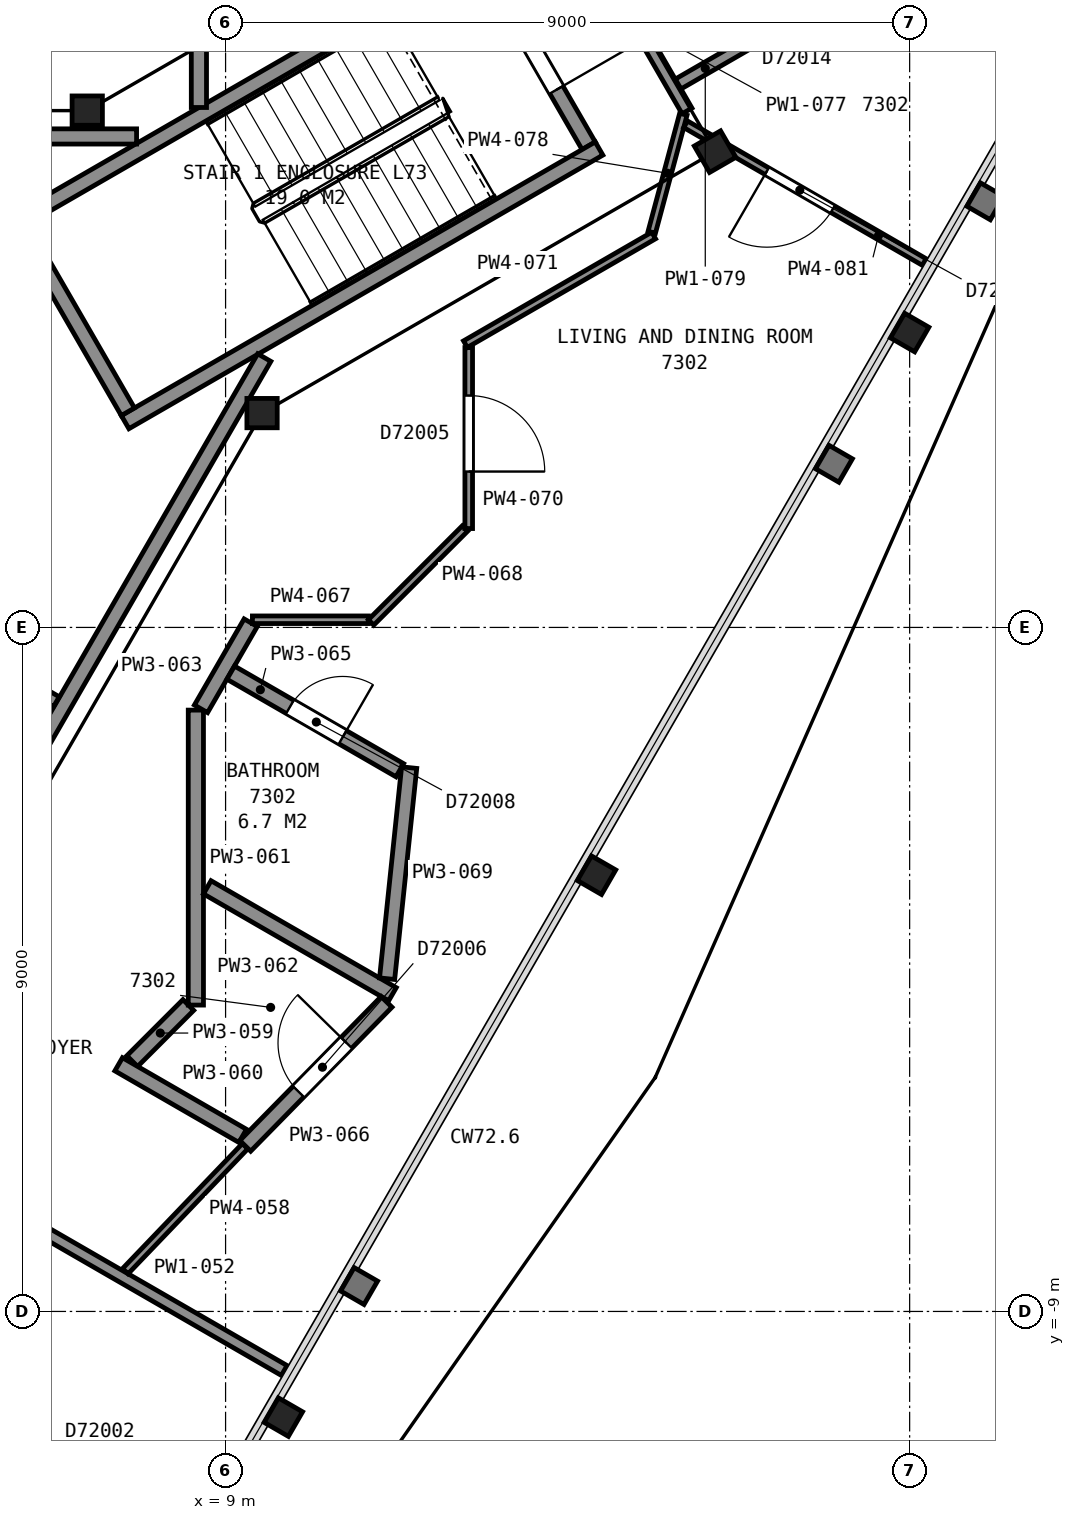
"""IFC4 building model, lengths in metres.
Left out: names, types, materials, properties, quantities, classifications, styles, units other than length and angle.
Written with IfcOpenShell. Run it as: python <this file> out.ifc"""

import sys

from ifc_helpers import new_model, si_unit, direction, frame, frame_2d, origin, origin_2d, place, context, subcontext, project, spatial, rectangle, i_section, extrude, element, fill, save


model = new_model("IFC4")
c1 = context("Model", 3, precision=1e-05, world=origin(), true_north=direction((0.0, 1.0)))
c2 = subcontext(c1, "Body", "Model", "MODEL_VIEW")
j1 = project(units=[si_unit("LENGTHUNIT", "METRE"), si_unit("PLANEANGLEUNIT", "RADIAN")], contexts=[c1])
p1 = place(None, origin())
s1 = spatial("IfcSite", under=j1, at=p1, CompositionType="ELEMENT")
p2 = place(p1, origin())
s2 = spatial("IfcBuilding", under=s1, at=p2, CompositionType="ELEMENT")
p3 = place(p2, frame((0.0, 0.0, 289.9)))
s3 = spatial("IfcBuildingStorey", under=s2, at=p3, CompositionType="ELEMENT", Elevation=289.9)
for number, where, z_axis, x_axis in (
    (1, (9.76, -10.39, 0.0), (0.0, 0.0, 1.0), (-0.5, -0.866, 0.0)),
    (2, (13.88, -3.26, 0.0), (0.0, 0.0, 1.0), (-0.5, -0.866, 0.0)),
    (3, (18.0, 3.88, 0.0), (0.0, 0.0, 1.0), (-0.5, -0.866, 0.0)),
):
    element("IfcColumn", number, at=place(p3, frame(where, z_axis=z_axis, x_axis=x_axis)), inside=s3, PredefinedType="COLUMN", context=c2, shape_type="SweptSolid", body=[
        extrude(i_section(OverallWidth=0.373, OverallDepth=0.368, WebThickness=0.015, FlangeThickness=0.024, FilletRadius=0.015, at=origin_2d()), origin(), (0.0, 0.0, 1.0), 3.7),
    ])
p4 = place(p3, frame((9.48, 2.82, 0.0), z_axis=(0.0, 0.0, 1.0), x_axis=(1.0, 0.0, 0.0)))
e4 = element("IfcColumn", 4, at=p4, inside=s3, PredefinedType="COLUMN", context=c2, shape_type="SweptSolid", body=[
    extrude(i_section(OverallWidth=0.399, OverallDepth=0.386, WebThickness=0.021, FlangeThickness=0.033, FilletRadius=0.015, at=origin_2d()), origin(), (0.0, 0.0, 1.0), 3.7),
])
p5 = place(p3, frame((15.44, 6.26, 0.0), z_axis=(0.0, 0.0, 1.0), x_axis=(0.5, -0.866025403784, 0.0)))
e5 = element("IfcColumn", 5, at=p5, inside=s3, PredefinedType="COLUMN", context=c2, shape_type="SweptSolid", body=[
    extrude(i_section(OverallWidth=0.401, OverallDepth=0.399, WebThickness=0.025, FlangeThickness=0.04, FilletRadius=0.015, at=origin_2d()), origin(), (0.0, 0.0, 1.0), 3.7),
])
p6 = place(p3, frame((7.18, 6.8, 0.0), z_axis=(0.0, 0.0, 1.0), x_axis=(1.0, 0.0, 0.0)))
e6 = element("IfcColumn", 6, at=p6, inside=s3, PredefinedType="COLUMN", context=c2, shape_type="SweptSolid", body=[
    extrude(i_section(OverallWidth=0.399, OverallDepth=0.386, WebThickness=0.021, FlangeThickness=0.033, FilletRadius=0.015, at=origin_2d()), origin(), (0.0, 0.0, 1.0), 3.7),
])
p7 = place(p3, frame((13.777, 6.338, 0.0), z_axis=(0.0, 0.0, 1.0), x_axis=(-0.500049511043, 0.865996816683, 0.0)))
e7 = element("IfcWall", 7, at=p7, inside=s3, PredefinedType="PARTITIONING", context=c2, shape_type="SweptSolid", body=[
    extrude(rectangle(XDim=2.8, YDim=0.2, at=frame_2d((1.4, 0.0))), origin(), (0.0, 0.0, 1.0), 3.45),
])
p8 = place(p7, frame((0.85, 0.0, 0.0)))
e8 = element("IfcOpeningElement", 8, at=p8, cuts=e7, PredefinedType="OPENING", context=c2, shape_type="SweptSolid", body=[
    extrude(rectangle(XDim=1.1, YDim=2.1, at=frame_2d((0.55, 1.05))), frame((0.0, 0.11, 0.0), z_axis=(0.0, -1.0, 0.0), x_axis=(1.0, 0.0, 0.0)), (0.0, 0.0, 1.0), 0.22),
])
for number, where, z_axis, x_axis in (
    (9, (6.178, 5.299, 0.0), (0.0, 0.0, 1.0), (0.866, 0.5, 0.0)),
    (10, (7.678, 2.701, 0.0), (0.0, 0.0, 1.0), (0.866, 0.5, 0.0)),
):
    element("IfcWall", number, at=place(p3, frame(where, z_axis=z_axis, x_axis=x_axis)), inside=s3, PredefinedType="PARTITIONING", context=c2, shape_type="SweptSolid", body=[
        extrude(rectangle(XDim=7.2, YDim=0.2, at=frame_2d((3.6, 0.0))), origin(), (0.0, 0.0, 1.0), 3.45),
    ])
p9 = place(p3, frame((7.715, 2.838, 0.0), z_axis=(0.0, 0.0, 1.0), x_axis=(-0.500049511043, 0.865996816683, 0.0)))
e11 = element("IfcWall", 11, at=p9, inside=s3, PredefinedType="PARTITIONING", context=c2, shape_type="SweptSolid", body=[
    extrude(rectangle(XDim=2.8, YDim=0.2, at=frame_2d((1.4, 0.0))), origin(), (0.0, 0.0, 1.0), 3.45),
])
p10 = place(p3, frame((7.829, 6.46, 0.0), z_axis=(0.0, 0.0, 1.0), x_axis=(-1.0, 0.0, 0.0)))
e12 = element("IfcWall", 12, at=p10, inside=s3, PredefinedType="PARTITIONING", context=c2, shape_type="SweptSolid", body=[
    extrude(rectangle(XDim=15.658, YDim=0.2, at=frame_2d((7.829, 0.0))), origin(), (0.0, 0.0, 1.0), 3.45),
])
p11 = place(p10, frame((12.168, 0.0, 0.0)))
e13 = element("IfcOpeningElement", 13, at=p11, cuts=e12, PredefinedType="OPENING", context=c2, shape_type="SweptSolid", body=[
    extrude(rectangle(XDim=1.2, YDim=2.1, at=frame_2d((0.6, 1.05))), frame((0.0, 0.11, 0.0), z_axis=(0.0, -1.0, 0.0), x_axis=(1.0, 0.0, 0.0)), (0.0, 0.0, 1.0), 0.22),
])
p12 = place(p3, frame((3.828, -6.29, 0.0), z_axis=(0.0, 0.0, 1.0), x_axis=(0.499979739078, 0.866037101117, 0.0)))
e14 = element("IfcWall", 14, at=p12, inside=s3, PredefinedType="PARTITIONING", context=c2, shape_type="SweptSolid", body=[
    extrude(rectangle(XDim=11.363, YDim=0.2, at=frame_2d((5.681, 0.0))), origin(), (0.0, 0.0, 1.0), 3.45),
])
p13 = place(p12, frame((0.55, 0.0, 0.0)))
e15 = element("IfcOpeningElement", 15, at=p13, cuts=e14, PredefinedType="OPENING", context=c2, shape_type="SweptSolid", body=[
    extrude(rectangle(XDim=1.2, YDim=2.1, at=frame_2d((0.6, 1.05))), frame((0.0, 0.11, 0.0), z_axis=(0.0, -1.0, 0.0), x_axis=(1.0, 0.0, 0.0)), (0.0, 0.0, 1.0), 0.22),
])
p14 = place(p3, frame((6.774, -0.978, 0.0), z_axis=(0.0, 0.0, 1.0), x_axis=(-0.866062920605, 0.499935013329, 0.0)))
e16 = element("IfcWall", 16, at=p14, inside=s3, PredefinedType="PARTITIONING", context=c2, shape_type="SweptSolid", body=[
    extrude(rectangle(XDim=2.22, YDim=0.15, at=frame_2d((1.11, 0.0))), origin(), (0.0, 0.0, 1.0), 3.45),
])
p15 = place(p14, frame((0.646, 0.0, 0.0)))
e17 = element("IfcOpeningElement", 17, at=p15, cuts=e16, PredefinedType="OPENING", context=c2, shape_type="SweptSolid", body=[
    extrude(rectangle(XDim=0.9, YDim=2.1, at=frame_2d((0.45, 1.05))), frame((0.0, 0.085, 0.0), z_axis=(0.0, -1.0, 0.0), x_axis=(1.0, 0.0, 0.0)), (0.0, 0.0, 1.0), 0.17),
])
p16 = place(p3, frame((3.682, -9.495, 0.0), z_axis=(0.0, 0.0, 1.0), x_axis=(0.866046690806, -0.499963127985, 0.0)))
e18 = element("IfcWall", 18, at=p16, inside=s3, PredefinedType="PARTITIONING", context=c2, shape_type="SweptSolid", body=[
    extrude(rectangle(XDim=3.454, YDim=0.2, at=frame_2d((1.727, 0.0))), origin(), (0.0, 0.0, 1.0), 2.723),
])
p17 = place(p3, frame((9.772, -9.777, 0.0), z_axis=(0.0, 0.0, 1.0), x_axis=(-0.866083818164, 0.499898809675, 0.0)))
e19 = element("IfcWall", 19, at=p17, inside=s3, PredefinedType="PARTITIONING", context=c2, shape_type="SweptSolid", body=[
    extrude(rectangle(XDim=6.551, YDim=0.15, at=frame_2d((3.275, 0.0))), origin(), (0.0, 0.0, 1.0), 2.723),
])
p18 = place(p17, frame((4.001, 0.0, 0.0)))
e20 = element("IfcOpeningElement", 20, at=p18, cuts=e19, PredefinedType="OPENING", context=c2, shape_type="SweptSolid", body=[
    extrude(rectangle(XDim=1.0, YDim=2.1, at=frame_2d((0.5, 1.05))), frame((0.0, 0.085, 0.0), z_axis=(0.0, -1.0, 0.0), x_axis=(1.0, 0.0, 0.0)), (0.0, 0.0, 1.0), 0.17),
])
p19 = place(p3, frame((7.681, -8.47, 0.0), z_axis=(0.0, 0.0, 1.0), x_axis=(0.691774963189, 0.722113149239, 0.0)))
e21 = element("IfcWall", 21, at=p19, inside=s3, PredefinedType="PARTITIONING", context=c2, shape_type="SweptSolid", body=[
    extrude(rectangle(XDim=2.277, YDim=0.1, at=frame_2d((1.139, 0.0))), origin(), (0.0, 0.0, 1.0), 2.723),
])
p20 = place(p3, frame((7.772, -5.706, 0.0), z_axis=(0.0, 0.0, 1.0), x_axis=(0.707106781187, 0.707106781187, 0.0)))
e22 = element("IfcWall", 22, at=p20, inside=s3, PredefinedType="PARTITIONING", context=c2, shape_type="SweptSolid", body=[
    extrude(rectangle(XDim=1.044, YDim=0.2, at=frame_2d((0.522, 0.0))), origin(), (0.0, 0.0, 1.0), 2.723),
])
p21 = place(p3, frame((7.594, -5.748, 0.0), z_axis=(0.0, 0.0, 1.0), x_axis=(0.866049635583, -0.499958026946, 0.0)))
e23 = element("IfcWall", 23, at=p21, inside=s3, PredefinedType="PARTITIONING", context=c2, shape_type="SweptSolid", body=[
    extrude(rectangle(XDim=1.884, YDim=0.2, at=frame_2d((0.942, 0.0))), origin(), (0.0, 0.0, 1.0), 2.723),
])
p22 = place(p3, frame((8.609, -4.969, 0.0), z_axis=(0.0, 0.0, 1.0), x_axis=(0.0, 1.0, 0.0)))
e24 = element("IfcWall", 24, at=p22, inside=s3, PredefinedType="PARTITIONING", context=c2, shape_type="SweptSolid", body=[
    extrude(rectangle(XDim=3.881, YDim=0.2, at=frame_2d((1.94, 0.0))), origin(), (0.0, 0.0, 1.0), 2.723),
])
p23 = place(p3, frame((8.759, -3.42, 0.0), z_axis=(0.0, 0.0, 1.0), x_axis=(0.866098885879, -0.499872703674, 0.0)))
e25 = element("IfcWall", 25, at=p23, inside=s3, PredefinedType="PARTITIONING", context=c2, shape_type="SweptSolid", body=[
    extrude(rectangle(XDim=2.813, YDim=0.2, at=frame_2d((1.407, 0.0))), origin(), (0.0, 0.0, 1.0), 2.723),
])
p24 = place(p3, frame((8.677, -1.071, 0.0), z_axis=(0.0, 0.0, 1.0), x_axis=(0.49993245451, 0.866064397679, 0.0)))
e26 = element("IfcWall", 26, at=p24, inside=s3, PredefinedType="PARTITIONING", context=c2, shape_type="SweptSolid", body=[
    extrude(rectangle(XDim=1.308, YDim=0.2, at=frame_2d((0.654, 0.0))), origin(), (0.0, 0.0, 1.0), 2.723),
])
p25 = place(p3, frame((8.649, 6.841, 0.0), z_axis=(0.0, 0.0, 1.0), x_axis=(0.0, 1.0, 0.0)))
e27 = element("IfcWall", 27, at=p25, inside=s3, PredefinedType="PARTITIONING", context=c2, shape_type="SweptSolid", body=[
    extrude(rectangle(XDim=1.528, YDim=0.2, at=frame_2d((0.764, 0.0))), origin(), (0.0, 0.0, 1.0), 2.723),
])
p26 = place(p3, frame((11.292, -1.879, 0.0), z_axis=(0.0, 0.0, 1.0), x_axis=(-0.866123870273, 0.499829412243, 0.0)))
e28 = element("IfcWall", 28, at=p26, inside=s3, PredefinedType="PARTITIONING", context=c2, shape_type="SweptSolid", body=[
    extrude(rectangle(XDim=2.569, YDim=0.2, at=frame_2d((1.284, 0.0))), origin(), (0.0, 0.0, 1.0), 2.723),
])
p27 = place(p26, frame((0.869, 0.0, 0.0)))
e29 = element("IfcOpeningElement", 29, at=p27, cuts=e28, PredefinedType="OPENING", context=c2, shape_type="SweptSolid", body=[
    extrude(rectangle(XDim=0.8, YDim=2.1, at=frame_2d((0.4, 1.05))), frame((0.0, 0.11, 0.0), z_axis=(0.0, -1.0, 0.0), x_axis=(1.0, 0.0, 0.0)), (0.0, 0.0, 1.0), 0.22),
])
p28 = place(p3, frame((9.259, -6.821, 0.0), z_axis=(0.0, 0.0, 1.0), x_axis=(0.700360124324, 0.713789672282, 0.0)))
e30 = element("IfcWall", 30, at=p28, inside=s3, PredefinedType="PARTITIONING", context=c2, shape_type="SweptSolid", body=[
    extrude(rectangle(XDim=2.654, YDim=0.2, at=frame_2d((1.327, 0.0))), origin(), (0.0, 0.0, 1.0), 2.723),
])
p29 = place(p28, frame((1.0, 0.0, 0.0)))
e31 = element("IfcOpeningElement", 31, at=p29, cuts=e30, PredefinedType="OPENING", context=c2, shape_type="SweptSolid", body=[
    extrude(rectangle(XDim=0.9, YDim=2.1, at=frame_2d((0.45, 1.05))), frame((0.0, 0.11, 0.0), z_axis=(0.0, -1.0, 0.0), x_axis=(1.0, 0.0, 0.0)), (0.0, 0.0, 1.0), 0.22),
])
p30 = place(p3, frame((9.353, 0.101, 0.0), z_axis=(0.0, 0.0, 1.0), x_axis=(1.0, 0.0, 0.0)))
e32 = element("IfcWall", 32, at=p30, inside=s3, PredefinedType="PARTITIONING", context=c2, shape_type="SweptSolid", body=[
    extrude(rectangle(XDim=1.526, YDim=0.1, at=frame_2d((0.763, 0.0))), origin(), (0.0, 0.0, 1.0), 2.723),
])
p31 = place(p3, frame((10.914, 0.066, 0.0), z_axis=(0.0, 0.0, 1.0), x_axis=(0.707106781187, 0.707106781187, 0.0)))
e33 = element("IfcWall", 33, at=p31, inside=s3, PredefinedType="PARTITIONING", context=c2, shape_type="SweptSolid", body=[
    extrude(rectangle(XDim=1.748, YDim=0.1, at=frame_2d((0.874, 0.0))), origin(), (0.0, 0.0, 1.0), 2.723),
])
p32 = place(p3, frame((11.125, -4.622, 0.0), z_axis=(0.0, 0.0, 1.0), x_axis=(0.103952036587, 0.99458231137, 0.0)))
e34 = element("IfcWall", 34, at=p32, inside=s3, PredefinedType="PARTITIONING", context=c2, shape_type="SweptSolid", body=[
    extrude(rectangle(XDim=2.792, YDim=0.2, at=frame_2d((1.396, 0.0))), origin(), (0.0, 0.0, 1.0), 2.723),
])
p33 = place(p3, frame((12.199, 3.682, 0.0), z_axis=(0.0, 0.0, 1.0), x_axis=(0.0, -1.0, 0.0)))
e35 = element("IfcWall", 35, at=p33, inside=s3, PredefinedType="PARTITIONING", context=c2, shape_type="SweptSolid", body=[
    extrude(rectangle(XDim=2.381, YDim=0.1, at=frame_2d((1.19, 0.0))), origin(), (0.0, 0.0, 1.0), 2.723),
])
p34 = place(p33, frame((0.631, 0.0, 0.0)))
e36 = element("IfcOpeningElement", 36, at=p34, cuts=e35, PredefinedType="OPENING", context=c2, shape_type="SweptSolid", body=[
    extrude(rectangle(XDim=1.0, YDim=2.1, at=frame_2d((0.5, 1.05))), frame((0.0, 0.06, 0.0), z_axis=(0.0, -1.0, 0.0), x_axis=(1.0, 0.0, 0.0)), (0.0, 0.0, 1.0), 0.12),
])
p35 = place(p3, frame((12.156, 3.727, 0.0), z_axis=(0.0, 0.0, 1.0), x_axis=(0.866012137121, 0.500022977831, 0.0)))
e37 = element("IfcWall", 37, at=p35, inside=s3, PredefinedType="PARTITIONING", context=c2, shape_type="SweptSolid", body=[
    extrude(rectangle(XDim=2.86, YDim=0.1, at=frame_2d((1.43, 0.0))), origin(), (0.0, 0.0, 1.0), 2.723),
])
p36 = place(p3, frame((13.759, 9.069, 0.0), z_axis=(0.0, 0.0, 1.0), x_axis=(0.500020344131, -0.866013657776, 0.0)))
e38 = element("IfcWall", 38, at=p36, inside=s3, PredefinedType="PARTITIONING", context=c2, shape_type="SweptSolid", body=[
    extrude(rectangle(XDim=2.625, YDim=0.15, at=frame_2d((1.312, 0.0))), origin(), (0.0, 0.0, 1.0), 2.723),
])
p37 = place(p3, frame((14.607, 5.2, 0.0), z_axis=(0.0, 0.0, 1.0), x_axis=(0.258589257768, 0.965987368327, 0.0)))
e39 = element("IfcWall", 39, at=p37, inside=s3, PredefinedType="PARTITIONING", context=c2, shape_type="SweptSolid", body=[
    extrude(rectangle(XDim=1.607, YDim=0.1, at=frame_2d((0.803, 0.0))), origin(), (0.0, 0.0, 1.0), 2.723),
])
p38 = place(p3, frame((14.954, 7.149, 0.0), z_axis=(0.0, 0.0, 1.0), x_axis=(0.865960792519, 0.5001118933, 0.0)))
e40 = element("IfcWall", 40, at=p38, inside=s3, PredefinedType="PARTITIONING", context=c2, shape_type="SweptSolid", body=[
    extrude(rectangle(XDim=1.375, YDim=0.15, at=frame_2d((0.688, 0.0))), origin(), (0.0, 0.0, 1.0), 2.723),
])
p39 = place(p3, frame((15.052, 6.62, 0.0), z_axis=(0.0, 0.0, 1.0), x_axis=(0.866029693906, -0.499992569217, 0.0)))
e41 = element("IfcWall", 41, at=p39, inside=s3, PredefinedType="PARTITIONING", context=c2, shape_type="SweptSolid", body=[
    extrude(rectangle(XDim=3.625, YDim=0.1, at=frame_2d((1.812, 0.0))), origin(), (0.0, 0.0, 1.0), 2.723),
])
p40 = place(p39, frame((1.235, 0.0, 0.0)))
e42 = element("IfcOpeningElement", 42, at=p40, cuts=e41, PredefinedType="OPENING", context=c2, shape_type="SweptSolid", body=[
    extrude(rectangle(XDim=1.0, YDim=2.1, at=frame_2d((0.5, 1.05))), frame((0.0, 0.06, 0.0), z_axis=(0.0, -1.0, 0.0), x_axis=(1.0, 0.0, 0.0)), (0.0, 0.0, 1.0), 0.12),
])
p41 = place(p8, origin())
e43 = element("IfcDoor", 43, at=p41, inside=s3, OperationType="SINGLE_SWING_LEFT", PredefinedType="DOOR", context=c2, shape_type="SweptSolid", body=[
    extrude(rectangle(XDim=1.1, YDim=2.1, at=frame_2d((0.55, 1.05))), frame((0.0, 0.025, 0.0), z_axis=(0.0, -1.0, 0.0), x_axis=(1.0, 0.0, 0.0)), (0.0, 0.0, 1.0), 0.05),
])
fill(e8, e43)
p42 = place(p27, origin())
e44 = element("IfcDoor", 44, at=p42, inside=s3, OperationType="SINGLE_SWING_LEFT", PredefinedType="DOOR", context=c2, shape_type="SweptSolid", body=[
    extrude(rectangle(XDim=0.8, YDim=2.1, at=frame_2d((0.4, 1.05))), frame((0.0, 0.025, 0.0), z_axis=(0.0, -1.0, 0.0), x_axis=(1.0, 0.0, 0.0)), (0.0, 0.0, 1.0), 0.05),
])
fill(e29, e44)
p43 = place(p29, origin())
e45 = element("IfcDoor", 45, at=p43, inside=s3, OperationType="SINGLE_SWING_RIGHT", PredefinedType="DOOR", context=c2, shape_type="SweptSolid", body=[
    extrude(rectangle(XDim=0.9, YDim=2.1, at=frame_2d((0.45, 1.05))), frame((0.0, 0.025, 0.0), z_axis=(0.0, -1.0, 0.0), x_axis=(1.0, 0.0, 0.0)), (0.0, 0.0, 1.0), 0.05),
])
fill(e31, e45)
p44 = place(p34, origin())
e46 = element("IfcDoor", 46, at=p44, inside=s3, OperationType="SINGLE_SWING_RIGHT", PredefinedType="DOOR", context=c2, shape_type="SweptSolid", body=[
    extrude(rectangle(XDim=1.0, YDim=2.1, at=frame_2d((0.5, 1.05))), frame((0.0, 0.025, 0.0), z_axis=(0.0, -1.0, 0.0), x_axis=(1.0, 0.0, 0.0)), (0.0, 0.0, 1.0), 0.05),
])
fill(e36, e46)
p45 = place(p40, origin())
e47 = element("IfcDoor", 47, at=p45, inside=s3, OperationType="SINGLE_SWING_LEFT", PredefinedType="DOOR", context=c2, shape_type="SweptSolid", body=[
    extrude(rectangle(XDim=1.0, YDim=2.1, at=frame_2d((0.5, 1.05))), frame((0.0, 0.025, 0.0), z_axis=(0.0, -1.0, 0.0), x_axis=(1.0, 0.0, 0.0)), (0.0, 0.0, 1.0), 0.05),
])
fill(e42, e47)
save(model, sys.argv[1])
